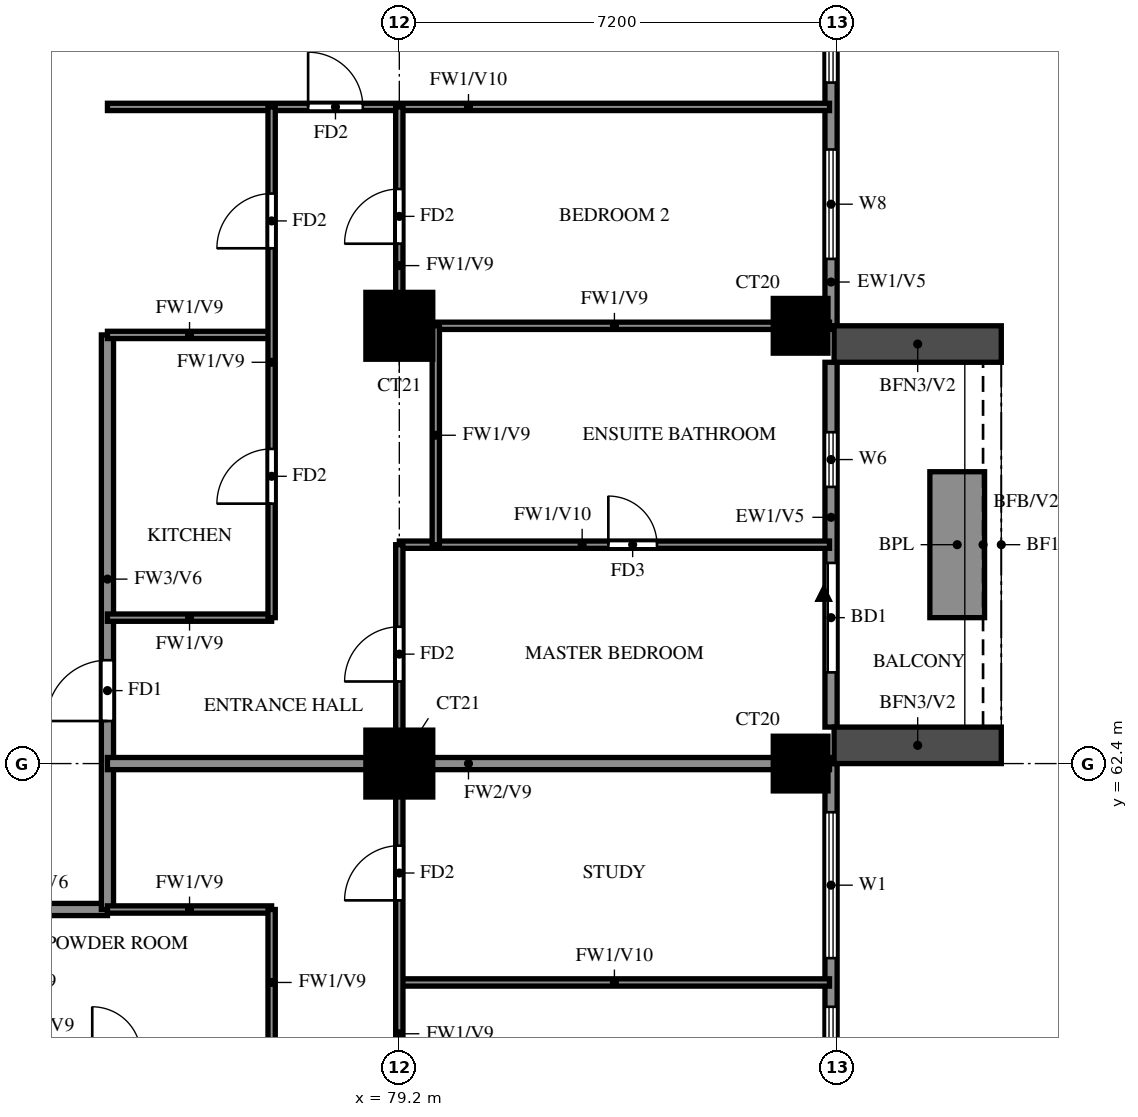
"""IFC4 building model, lengths in metres.
Left out: names, types, materials, properties, quantities, classifications, styles, units other than length and angle.
Written with IfcOpenShell. Run it as: python <this file> out.ifc"""

import sys

from ifc_helpers import new_model, si_unit, direction, frame, frame_2d, origin, origin_2d, place, context, subcontext, project, spatial, rectangle, extrude, source, transform, mapped, element, fill, save


model = new_model("IFC4")
c1 = context("Model", 3, precision=1e-05, world=origin(), true_north=direction((0.0, 1.0)))
c2 = subcontext(c1, "Body", "Model", "MODEL_VIEW")
j1 = project(units=[si_unit("LENGTHUNIT", "METRE"), si_unit("PLANEANGLEUNIT", "RADIAN")], contexts=[c1])
p1 = place(None, origin())
s1 = spatial("IfcSite", under=j1, at=p1, CompositionType="ELEMENT")
p2 = place(p1, origin())
s2 = spatial("IfcBuilding", under=s1, at=p2, CompositionType="ELEMENT")
p3 = place(p2, frame((0.0, 0.0, 134.0)))
s3 = spatial("IfcBuildingStorey", under=s2, at=p3, CompositionType="ELEMENT", Elevation=134.0)
m1 = source(origin(), c2, "Body", "SweptSolid", [
    extrude(rectangle(XDim=1.1, YDim=1.1, at=origin_2d()), origin(), (0.0, 0.0, 1.0), 3.15),
])
p4 = place(p3, frame((79.2, 62.4, 0.0), z_axis=(0.0, 0.0, 1.0), x_axis=(1.0, 0.0, 0.0)))
e1 = element("IfcColumn", 1, at=p4, inside=s3, PredefinedType="COLUMN", context=c2, shape_type="MappedRepresentation", body=[
    mapped(m1, transform((0.0, 0.0, 0.0))),
])
m2 = source(origin(), c2, "Body", "SweptSolid", [
    extrude(rectangle(XDim=0.9, YDim=0.9, at=origin_2d()), origin(), (0.0, 0.0, 1.0), 3.15),
])
p5 = place(p3, frame((85.8, 62.4, 0.0), z_axis=(0.0, 0.0, 1.0), x_axis=(1.0, 0.0, 0.0)))
e2 = element("IfcColumn", 2, at=p5, inside=s3, PredefinedType="COLUMN", context=c2, shape_type="MappedRepresentation", body=[
    mapped(m2, transform((0.0, 0.0, 0.0))),
])
p6 = place(p3, frame((79.2, 69.6, 0.0), z_axis=(0.0, 0.0, 1.0), x_axis=(1.0, 0.0, 0.0)))
e3 = element("IfcColumn", 3, at=p6, inside=s3, PredefinedType="COLUMN", context=c2, shape_type="MappedRepresentation", body=[
    mapped(m1, transform((0.0, 0.0, 0.0))),
])
p7 = place(p3, frame((85.8, 69.6, 0.0), z_axis=(0.0, 0.0, 1.0), x_axis=(1.0, 0.0, 0.0)))
e4 = element("IfcColumn", 4, at=p7, inside=s3, PredefinedType="COLUMN", context=c2, shape_type="MappedRepresentation", body=[
    mapped(m2, transform((0.0, 0.0, 0.0))),
])
p8 = place(p3, frame((86.3, 48.2, 0.0), z_axis=(0.0, 0.0, 1.0), x_axis=(0.0, 1.0, 0.0)))
e5 = element("IfcWall", 5, at=p8, inside=s3, PredefinedType="SOLIDWALL", context=c2, shape_type="SweptSolid", body=[
    extrude(rectangle(XDim=14.2, YDim=0.2, at=frame_2d((7.1, 0.0))), origin(), (0.0, 0.0, 1.0), 3.15),
])
p9 = place(p8, frame((0.6, 0.0, 0.6)))
e6 = element("IfcOpeningElement", 6, at=p9, cuts=e5, PredefinedType="OPENING", context=c2, shape_type="SweptSolid", body=[
    extrude(rectangle(XDim=2.4, YDim=2.4, at=frame_2d((1.2, 1.2))), frame((0.0, 0.11, 0.0), z_axis=(0.0, -1.0, 0.0), x_axis=(1.0, 0.0, 0.0)), (0.0, 0.0, 1.0), 0.22),
])
p10 = place(p8, frame((3.8, 0.0, 0.6)))
e7 = element("IfcOpeningElement", 7, at=p10, cuts=e5, PredefinedType="OPENING", context=c2, shape_type="SweptSolid", body=[
    extrude(rectangle(XDim=2.4, YDim=2.4, at=frame_2d((1.2, 1.2))), frame((0.0, 0.11, 0.0), z_axis=(0.0, -1.0, 0.0), x_axis=(1.0, 0.0, 0.0)), (0.0, 0.0, 1.0), 0.22),
])
p11 = place(p8, frame((7.8, 0.0, 0.6)))
e8 = element("IfcOpeningElement", 8, at=p11, cuts=e5, PredefinedType="OPENING", context=c2, shape_type="SweptSolid", body=[
    extrude(rectangle(XDim=2.4, YDim=2.4, at=frame_2d((1.2, 1.2))), frame((0.0, 0.11, 0.0), z_axis=(0.0, -1.0, 0.0), x_axis=(1.0, 0.0, 0.0)), (0.0, 0.0, 1.0), 0.22),
])
p12 = place(p8, frame((11.0, 0.0, 0.6)))
e9 = element("IfcOpeningElement", 9, at=p12, cuts=e5, PredefinedType="OPENING", context=c2, shape_type="SweptSolid", body=[
    extrude(rectangle(XDim=2.4, YDim=2.4, at=frame_2d((1.2, 1.2))), frame((0.0, 0.11, 0.0), z_axis=(0.0, -1.0, 0.0), x_axis=(1.0, 0.0, 0.0)), (0.0, 0.0, 1.0), 0.22),
])
p13 = place(p3, frame((86.3, 63.0, 0.0), z_axis=(0.0, 0.0, 1.0), x_axis=(0.0, 1.0, 0.0)))
e10 = element("IfcWall", 10, at=p13, inside=s3, PredefinedType="SOLIDWALL", context=c2, shape_type="SweptSolid", body=[
    extrude(rectangle(XDim=6.0, YDim=0.2, at=frame_2d((3.0, 0.0))), origin(), (0.0, 0.0, 1.0), 3.15),
])
p14 = place(p13, frame((0.9, 0.0, 0.0)))
e11 = element("IfcOpeningElement", 11, at=p14, cuts=e10, PredefinedType="OPENING", context=c2, shape_type="SweptSolid", body=[
    extrude(rectangle(XDim=1.8, YDim=2.4, at=frame_2d((0.9, 1.2))), frame((0.0, 0.11, 0.0), z_axis=(0.0, -1.0, 0.0), x_axis=(1.0, 0.0, 0.0)), (0.0, 0.0, 1.0), 0.22),
])
p15 = place(p13, frame((3.95, 0.0, 1.5)))
e12 = element("IfcOpeningElement", 12, at=p15, cuts=e10, PredefinedType="OPENING", context=c2, shape_type="SweptSolid", body=[
    extrude(rectangle(XDim=0.9, YDim=0.9, at=frame_2d((0.45, 0.45))), frame((0.0, 0.11, 0.0), z_axis=(0.0, -1.0, 0.0), x_axis=(1.0, 0.0, 0.0)), (0.0, 0.0, 1.0), 0.22),
])
p16 = place(p3, frame((86.3, 69.6, 0.0), z_axis=(0.0, 0.0, 1.0), x_axis=(0.0, 1.0, 0.0)))
e13 = element("IfcWall", 13, at=p16, inside=s3, PredefinedType="SOLIDWALL", context=c2, shape_type="SweptSolid", body=[
    extrude(rectangle(XDim=7.2, YDim=0.2, at=frame_2d((3.6, 0.0))), origin(), (0.0, 0.0, 1.0), 3.15),
])
p17 = place(p16, frame((1.1, 0.0, 0.6)))
e14 = element("IfcOpeningElement", 14, at=p17, cuts=e13, PredefinedType="OPENING", context=c2, shape_type="SweptSolid", body=[
    extrude(rectangle(XDim=1.8, YDim=2.4, at=frame_2d((0.9, 1.2))), frame((0.0, 0.11, 0.0), z_axis=(0.0, -1.0, 0.0), x_axis=(1.0, 0.0, 0.0)), (0.0, 0.0, 1.0), 0.22),
])
p18 = place(p16, frame((4.0, 0.0, 0.6)))
e15 = element("IfcOpeningElement", 15, at=p18, cuts=e13, PredefinedType="OPENING", context=c2, shape_type="SweptSolid", body=[
    extrude(rectangle(XDim=2.4, YDim=2.4, at=frame_2d((1.2, 1.2))), frame((0.0, 0.11, 0.0), z_axis=(0.0, -1.0, 0.0), x_axis=(1.0, 0.0, 0.0)), (0.0, 0.0, 1.0), 0.22),
])
for number, where, z_axis, x_axis in (
    (16, (86.35, 62.7, 0.0), (0.0, 0.0, 1.0), (1.0, 0.0, 0.0)),
    (17, (86.35, 69.3, 0.0), (0.0, 0.0, 1.0), (1.0, 0.0, 0.0)),
):
    element("IfcWall", number, at=place(p3, frame(where, z_axis=z_axis, x_axis=x_axis)), inside=s3, PredefinedType="SOLIDWALL", context=c2, shape_type="SweptSolid", body=[
        extrude(rectangle(XDim=2.75, YDim=0.6, at=frame_2d((1.375, 0.0))), origin(), (0.0, 0.0, 1.0), 2.8),
    ])
p19 = place(p3, frame((88.375, 64.8, 0.0), z_axis=(0.0, 0.0, 1.0), x_axis=(0.0, 1.0, 0.0)))
e18 = element("IfcWall", 18, at=p19, inside=s3, PredefinedType="SOLIDWALL", context=c2, shape_type="SweptSolid", body=[
    extrude(rectangle(XDim=2.4, YDim=0.9, at=frame_2d((1.2, 0.0))), origin(), (0.0, 0.0, 1.0), 0.9),
])
p20 = place(p3, frame((72.0, 60.0, 0.0), z_axis=(0.0, 0.0, 1.0), x_axis=(1.0, 0.0, 0.0)))
e19 = element("IfcWall", 19, at=p20, inside=s3, PredefinedType="SOLIDWALL", context=c2, shape_type="SweptSolid", body=[
    extrude(rectangle(XDim=2.4, YDim=0.2, at=frame_2d((1.2, 0.0))), origin(), (0.0, 0.0, 1.0), 3.15),
])
p21 = place(p3, frame((74.4, 60.0, 0.0), z_axis=(0.0, 0.0, 1.0), x_axis=(0.0, 1.0, 0.0)))
e20 = element("IfcWall", 20, at=p21, inside=s3, PredefinedType="SOLIDWALL", context=c2, shape_type="SweptSolid", body=[
    extrude(rectangle(XDim=9.45, YDim=0.2, at=frame_2d((4.725, 0.0))), origin(), (0.0, 0.0, 1.0), 3.15),
])
p22 = place(p21, frame((3.1, 0.0, 0.0)))
e21 = element("IfcOpeningElement", 21, at=p22, cuts=e20, PredefinedType="OPENING", context=c2, shape_type="SweptSolid", body=[
    extrude(rectangle(XDim=1.0, YDim=2.1, at=frame_2d((0.5, 1.05))), frame((0.0, 0.11, 0.0), z_axis=(0.0, -1.0, 0.0), x_axis=(1.0, 0.0, 0.0)), (0.0, 0.0, 1.0), 0.22),
])
p23 = place(p3, frame((74.4, 62.4, 0.0), z_axis=(0.0, 0.0, 1.0), x_axis=(1.0, 0.0, 0.0)))
e22 = element("IfcWall", 22, at=p23, inside=s3, PredefinedType="SOLIDWALL", context=c2, shape_type="SweptSolid", body=[
    extrude(rectangle(XDim=11.875, YDim=0.2, at=frame_2d((5.938, 0.0))), origin(), (0.0, 0.0, 1.0), 3.15),
])
p24 = place(p3, frame((79.2, 58.8, 0.0), z_axis=(0.0, 0.0, 1.0), x_axis=(1.0, 0.0, 0.0)))
e23 = element("IfcWall", 23, at=p24, inside=s3, PredefinedType="PARTITIONING", context=c2, shape_type="SweptSolid", body=[
    extrude(rectangle(XDim=7.075, YDim=0.12, at=frame_2d((3.538, 0.0))), origin(), (0.0, 0.0, 1.0), 2.25),
])
for number, where, z_axis, x_axis in (
    (24, (74.4, 60.0, 0.0), (0.0, 0.0, 1.0), (1.0, 0.0, 0.0)),
    (25, (74.4, 64.8, 0.0), (0.0, 0.0, 1.0), (1.0, 0.0, 0.0)),
):
    element("IfcWall", number, at=place(p3, frame(where, z_axis=z_axis, x_axis=x_axis)), inside=s3, PredefinedType="PARTITIONING", context=c2, shape_type="SweptSolid", body=[
        extrude(rectangle(XDim=2.7, YDim=0.12, at=frame_2d((1.35, 0.0))), origin(), (0.0, 0.0, 1.0), 3.15),
    ])
p25 = place(p3, frame((79.2, 66.0, 0.0), z_axis=(0.0, 0.0, 1.0), x_axis=(1.0, 0.0, 0.0)))
e26 = element("IfcWall", 26, at=p25, inside=s3, PredefinedType="PARTITIONING", context=c2, shape_type="SweptSolid", body=[
    extrude(rectangle(XDim=7.075, YDim=0.12, at=frame_2d((3.538, 0.0))), origin(), (0.0, 0.0, 1.0), 2.25),
])
p26 = place(p25, frame((3.438, 0.0, 0.0)))
e27 = element("IfcOpeningElement", 27, at=p26, cuts=e26, PredefinedType="OPENING", context=c2, shape_type="SweptSolid", body=[
    extrude(rectangle(XDim=0.8, YDim=2.1, at=frame_2d((0.4, 1.05))), frame((0.0, 0.07, 0.0), z_axis=(0.0, -1.0, 0.0), x_axis=(1.0, 0.0, 0.0)), (0.0, 0.0, 1.0), 0.14),
])
p27 = place(p3, frame((74.4, 69.45, 0.0), z_axis=(0.0, 0.0, 1.0), x_axis=(1.0, 0.0, 0.0)))
e28 = element("IfcWall", 28, at=p27, inside=s3, PredefinedType="PARTITIONING", context=c2, shape_type="SweptSolid", body=[
    extrude(rectangle(XDim=2.7, YDim=0.12, at=frame_2d((1.35, 0.0))), origin(), (0.0, 0.0, 1.0), 3.15),
])
p28 = place(p3, frame((79.2, 69.6, 0.0), z_axis=(0.0, 0.0, 1.0), x_axis=(1.0, 0.0, 0.0)))
e29 = element("IfcWall", 29, at=p28, inside=s3, PredefinedType="PARTITIONING", context=c2, shape_type="SweptSolid", body=[
    extrude(rectangle(XDim=7.075, YDim=0.12, at=frame_2d((3.538, 0.0))), origin(), (0.0, 0.0, 1.0), 3.15),
])
p29 = place(p3, frame((74.4, 73.2, 0.0), z_axis=(0.0, 0.0, 1.0), x_axis=(1.0, 0.0, 0.0)))
e30 = element("IfcWall", 30, at=p29, inside=s3, PredefinedType="PARTITIONING", context=c2, shape_type="SweptSolid", body=[
    extrude(rectangle(XDim=11.875, YDim=0.12, at=frame_2d((5.938, 0.0))), origin(), (0.0, 0.0, 1.0), 2.25),
])
p30 = place(p29, frame((3.3, 0.0, 0.0)))
e31 = element("IfcOpeningElement", 31, at=p30, cuts=e30, PredefinedType="OPENING", context=c2, shape_type="SweptSolid", body=[
    extrude(rectangle(XDim=0.9, YDim=2.1, at=frame_2d((0.45, 1.05))), frame((0.0, 0.07, 0.0), z_axis=(0.0, -1.0, 0.0), x_axis=(1.0, 0.0, 0.0)), (0.0, 0.0, 1.0), 0.14),
])
p31 = place(p3, frame((77.1, 57.6, 0.0), z_axis=(0.0, 0.0, 1.0), x_axis=(0.0, 1.0, 0.0)))
e32 = element("IfcWall", 32, at=p31, inside=s3, PredefinedType="PARTITIONING", context=c2, shape_type="SweptSolid", body=[
    extrude(rectangle(XDim=2.4, YDim=0.12, at=frame_2d((1.2, 0.0))), origin(), (0.0, 0.0, 1.0), 3.15),
])
p32 = place(p3, frame((77.1, 64.8, 0.0), z_axis=(0.0, 0.0, 1.0), x_axis=(0.0, 1.0, 0.0)))
e33 = element("IfcWall", 33, at=p32, inside=s3, PredefinedType="PARTITIONING", context=c2, shape_type="SweptSolid", body=[
    extrude(rectangle(XDim=8.4, YDim=0.12, at=frame_2d((4.2, 0.0))), origin(), (0.0, 0.0, 1.0), 3.15),
])
p33 = place(p32, frame((1.875, 0.0, 0.0)))
e34 = element("IfcOpeningElement", 34, at=p33, cuts=e33, PredefinedType="OPENING", context=c2, shape_type="SweptSolid", body=[
    extrude(rectangle(XDim=0.9, YDim=2.1, at=frame_2d((0.45, 1.05))), frame((0.0, 0.07, 0.0), z_axis=(0.0, -1.0, 0.0), x_axis=(1.0, 0.0, 0.0)), (0.0, 0.0, 1.0), 0.14),
])
p34 = place(p32, frame((6.075, 0.0, 0.0)))
e35 = element("IfcOpeningElement", 35, at=p34, cuts=e33, PredefinedType="OPENING", context=c2, shape_type="SweptSolid", body=[
    extrude(rectangle(XDim=0.9, YDim=2.1, at=frame_2d((0.45, 1.05))), frame((0.0, 0.07, 0.0), z_axis=(0.0, -1.0, 0.0), x_axis=(1.0, 0.0, 0.0)), (0.0, 0.0, 1.0), 0.14),
])
p35 = place(p3, frame((79.2, 48.125, 0.0), z_axis=(0.0, 0.0, 1.0), x_axis=(0.0, 1.0, 0.0)))
e36 = element("IfcWall", 36, at=p35, inside=s3, PredefinedType="PARTITIONING", context=c2, shape_type="SweptSolid", body=[
    extrude(rectangle(XDim=17.875, YDim=0.12, at=frame_2d((8.938, 0.0))), origin(), (0.0, 0.0, 1.0), 3.15),
])
p36 = place(p35, frame((1.288, 0.0, 0.0)))
e37 = element("IfcOpeningElement", 37, at=p36, cuts=e36, PredefinedType="OPENING", context=c2, shape_type="SweptSolid", body=[
    extrude(rectangle(XDim=0.9, YDim=2.1, at=frame_2d((0.45, 1.05))), frame((0.0, 0.07, 0.0), z_axis=(0.0, -1.0, 0.0), x_axis=(1.0, 0.0, 0.0)), (0.0, 0.0, 1.0), 0.14),
])
p37 = place(p35, frame((7.825, 0.0, 0.0)))
e38 = element("IfcOpeningElement", 38, at=p37, cuts=e36, PredefinedType="OPENING", context=c2, shape_type="SweptSolid", body=[
    extrude(rectangle(XDim=1.5, YDim=2.1, at=frame_2d((0.75, 1.05))), frame((0.0, 0.07, 0.0), z_axis=(0.0, -1.0, 0.0), x_axis=(1.0, 0.0, 0.0)), (0.0, 0.0, 1.0), 0.14),
])
p38 = place(p35, frame((12.025, 0.0, 0.0)))
e39 = element("IfcOpeningElement", 39, at=p38, cuts=e36, PredefinedType="OPENING", context=c2, shape_type="SweptSolid", body=[
    extrude(rectangle(XDim=0.9, YDim=2.1, at=frame_2d((0.45, 1.05))), frame((0.0, 0.07, 0.0), z_axis=(0.0, -1.0, 0.0), x_axis=(1.0, 0.0, 0.0)), (0.0, 0.0, 1.0), 0.14),
])
p39 = place(p35, frame((15.625, 0.0, 0.0)))
e40 = element("IfcOpeningElement", 40, at=p39, cuts=e36, PredefinedType="OPENING", context=c2, shape_type="SweptSolid", body=[
    extrude(rectangle(XDim=0.9, YDim=2.1, at=frame_2d((0.45, 1.05))), frame((0.0, 0.07, 0.0), z_axis=(0.0, -1.0, 0.0), x_axis=(1.0, 0.0, 0.0)), (0.0, 0.0, 1.0), 0.14),
])
p40 = place(p3, frame((79.2, 69.6, 0.0), z_axis=(0.0, 0.0, 1.0), x_axis=(0.0, 1.0, 0.0)))
e41 = element("IfcWall", 41, at=p40, inside=s3, PredefinedType="PARTITIONING", context=c2, shape_type="SweptSolid", body=[
    extrude(rectangle(XDim=3.6, YDim=0.12, at=frame_2d((1.8, 0.0))), origin(), (0.0, 0.0, 1.0), 3.15),
])
p41 = place(p40, frame((1.35, 0.0, 0.0)))
e42 = element("IfcOpeningElement", 42, at=p41, cuts=e41, PredefinedType="OPENING", context=c2, shape_type="SweptSolid", body=[
    extrude(rectangle(XDim=0.9, YDim=2.1, at=frame_2d((0.45, 1.05))), frame((0.0, 0.07, 0.0), z_axis=(0.0, -1.0, 0.0), x_axis=(1.0, 0.0, 0.0)), (0.0, 0.0, 1.0), 0.14),
])
p42 = place(p3, frame((79.8, 66.0, 0.0), z_axis=(0.0, 0.0, 1.0), x_axis=(0.0, 1.0, 0.0)))
e43 = element("IfcWall", 43, at=p42, inside=s3, PredefinedType="PARTITIONING", context=c2, shape_type="SweptSolid", body=[
    extrude(rectangle(XDim=3.6, YDim=0.12, at=frame_2d((1.8, 0.0))), origin(), (0.0, 0.0, 1.0), 3.15),
])
p43 = place(p11, origin())
e44 = element("IfcWindow", 44, at=p43, inside=s3, PartitioningType="DOUBLE_PANEL_VERTICAL", PredefinedType="WINDOW", context=c2, shape_type="SweptSolid", body=[
    extrude(rectangle(XDim=2.4, YDim=2.4, at=frame_2d((1.2, 1.2))), frame((0.0, 0.03, 0.0), z_axis=(0.0, -1.0, 0.0), x_axis=(1.0, 0.0, 0.0)), (0.0, 0.0, 1.0), 0.06),
])
fill(e8, e44)
p44 = place(p12, origin())
e45 = element("IfcWindow", 45, at=p44, inside=s3, PartitioningType="DOUBLE_PANEL_VERTICAL", PredefinedType="WINDOW", context=c2, shape_type="SweptSolid", body=[
    extrude(rectangle(XDim=2.4, YDim=2.4, at=frame_2d((1.2, 1.2))), frame((0.0, 0.03, 0.0), z_axis=(0.0, -1.0, 0.0), x_axis=(1.0, 0.0, 0.0)), (0.0, 0.0, 1.0), 0.06),
])
fill(e9, e45)
p45 = place(p14, origin())
e46 = element("IfcDoor", 46, at=p45, inside=s3, OperationType="DOUBLE_DOOR_SLIDING", PredefinedType="DOOR", context=c2, shape_type="SweptSolid", body=[
    extrude(rectangle(XDim=1.8, YDim=2.4, at=frame_2d((0.9, 1.2))), frame((0.0, 0.025, 0.0), z_axis=(0.0, -1.0, 0.0), x_axis=(1.0, 0.0, 0.0)), (0.0, 0.0, 1.0), 0.05),
])
fill(e11, e46)
p46 = place(p15, origin())
e47 = element("IfcWindow", 47, at=p46, inside=s3, PartitioningType="SINGLE_PANEL", PredefinedType="WINDOW", context=c2, shape_type="SweptSolid", body=[
    extrude(rectangle(XDim=0.9, YDim=0.9, at=frame_2d((0.45, 0.45))), frame((0.0, 0.03, 0.0), z_axis=(0.0, -1.0, 0.0), x_axis=(1.0, 0.0, 0.0)), (0.0, 0.0, 1.0), 0.06),
])
fill(e12, e47)
p47 = place(p17, origin())
e48 = element("IfcWindow", 48, at=p47, inside=s3, PartitioningType="DOUBLE_PANEL_VERTICAL", PredefinedType="WINDOW", context=c2, shape_type="SweptSolid", body=[
    extrude(rectangle(XDim=1.8, YDim=2.4, at=frame_2d((0.9, 1.2))), frame((0.0, 0.03, 0.0), z_axis=(0.0, -1.0, 0.0), x_axis=(1.0, 0.0, 0.0)), (0.0, 0.0, 1.0), 0.06),
])
fill(e14, e48)
p48 = place(p18, origin())
e49 = element("IfcWindow", 49, at=p48, inside=s3, PartitioningType="DOUBLE_PANEL_VERTICAL", PredefinedType="WINDOW", context=c2, shape_type="SweptSolid", body=[
    extrude(rectangle(XDim=2.4, YDim=2.4, at=frame_2d((1.2, 1.2))), frame((0.0, 0.03, 0.0), z_axis=(0.0, -1.0, 0.0), x_axis=(1.0, 0.0, 0.0)), (0.0, 0.0, 1.0), 0.06),
])
fill(e15, e49)
p49 = place(p38, origin())
e50 = element("IfcDoor", 50, at=p49, inside=s3, OperationType="SINGLE_SWING_LEFT", PredefinedType="DOOR", context=c2, shape_type="SweptSolid", body=[
    extrude(rectangle(XDim=0.9, YDim=2.1, at=frame_2d((0.45, 1.05))), frame((0.0, 0.025, 0.0), z_axis=(0.0, -1.0, 0.0), x_axis=(1.0, 0.0, 0.0)), (0.0, 0.0, 1.0), 0.05),
])
fill(e39, e50)
p50 = place(p22, origin())
e51 = element("IfcDoor", 51, at=p50, inside=s3, OperationType="SINGLE_SWING_RIGHT", PredefinedType="DOOR", context=c2, shape_type="SweptSolid", body=[
    extrude(rectangle(XDim=1.0, YDim=2.1, at=frame_2d((0.5, 1.05))), frame((0.0, 0.025, 0.0), z_axis=(0.0, -1.0, 0.0), x_axis=(1.0, 0.0, 0.0)), (0.0, 0.0, 1.0), 0.05),
])
fill(e21, e51)
p51 = place(p39, origin())
e52 = element("IfcDoor", 52, at=p51, inside=s3, OperationType="SINGLE_SWING_LEFT", PredefinedType="DOOR", context=c2, shape_type="SweptSolid", body=[
    extrude(rectangle(XDim=0.9, YDim=2.1, at=frame_2d((0.45, 1.05))), frame((0.0, 0.025, 0.0), z_axis=(0.0, -1.0, 0.0), x_axis=(1.0, 0.0, 0.0)), (0.0, 0.0, 1.0), 0.05),
])
fill(e40, e52)
p52 = place(p26, origin())
e53 = element("IfcDoor", 53, at=p52, inside=s3, OperationType="SINGLE_SWING_LEFT", PredefinedType="DOOR", context=c2, shape_type="SweptSolid", body=[
    extrude(rectangle(XDim=0.8, YDim=2.1, at=frame_2d((0.4, 1.05))), frame((0.0, 0.025, 0.0), z_axis=(0.0, -1.0, 0.0), x_axis=(1.0, 0.0, 0.0)), (0.0, 0.0, 1.0), 0.05),
])
fill(e27, e53)
p53 = place(p41, origin())
e54 = element("IfcDoor", 54, at=p53, inside=s3, OperationType="SINGLE_SWING_RIGHT", PredefinedType="DOOR", context=c2, shape_type="SweptSolid", body=[
    extrude(rectangle(XDim=0.9, YDim=2.1, at=frame_2d((0.45, 1.05))), frame((0.0, 0.025, 0.0), z_axis=(0.0, -1.0, 0.0), x_axis=(1.0, 0.0, 0.0)), (0.0, 0.0, 1.0), 0.05),
])
fill(e42, e54)
p54 = place(p30, origin())
e55 = element("IfcDoor", 55, at=p54, inside=s3, OperationType="SINGLE_SWING_LEFT", PredefinedType="DOOR", context=c2, shape_type="SweptSolid", body=[
    extrude(rectangle(XDim=0.9, YDim=2.1, at=frame_2d((0.45, 1.05))), frame((0.0, 0.025, 0.0), z_axis=(0.0, -1.0, 0.0), x_axis=(1.0, 0.0, 0.0)), (0.0, 0.0, 1.0), 0.05),
])
fill(e31, e55)
p55 = place(p33, origin())
e56 = element("IfcDoor", 56, at=p55, inside=s3, OperationType="SINGLE_SWING_LEFT", PredefinedType="DOOR", context=c2, shape_type="SweptSolid", body=[
    extrude(rectangle(XDim=0.9, YDim=2.1, at=frame_2d((0.45, 1.05))), frame((0.0, 0.025, 0.0), z_axis=(0.0, -1.0, 0.0), x_axis=(1.0, 0.0, 0.0)), (0.0, 0.0, 1.0), 0.05),
])
fill(e34, e56)
p56 = place(p34, origin())
e57 = element("IfcDoor", 57, at=p56, inside=s3, OperationType="SINGLE_SWING_RIGHT", PredefinedType="DOOR", context=c2, shape_type="SweptSolid", body=[
    extrude(rectangle(XDim=0.9, YDim=2.1, at=frame_2d((0.45, 1.05))), frame((0.0, 0.025, 0.0), z_axis=(0.0, -1.0, 0.0), x_axis=(1.0, 0.0, 0.0)), (0.0, 0.0, 1.0), 0.05),
])
fill(e35, e57)
save(model, sys.argv[1])
